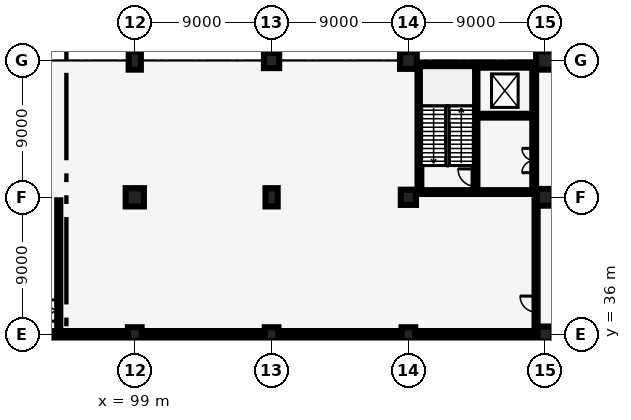
"""IFC4 building model, lengths in metres.
Left out: names, types, materials, properties, quantities, classifications, styles, units other than length and angle.
Written with IfcOpenShell. Run it as: python <this file> out.ifc"""

import sys

from ifc_helpers import new_model, si_unit, direction, frame, frame_2d, origin, origin_2d, place, context, subcontext, project, spatial, rectangle, extrude, element, fill, save


model = new_model("IFC4")
c1 = context("Model", 3, precision=1e-05, world=origin(), true_north=direction((0.0, 1.0)))
c2 = subcontext(c1, "Body", "Model", "MODEL_VIEW")
j1 = project(units=[si_unit("LENGTHUNIT", "METRE"), si_unit("PLANEANGLEUNIT", "RADIAN")], contexts=[c1])
p1 = place(None, origin())
s1 = spatial("IfcSite", under=j1, at=p1, CompositionType="ELEMENT")
p2 = place(p1, origin())
s2 = spatial("IfcBuilding", under=s1, at=p2, CompositionType="ELEMENT")
p3 = place(p2, frame((0.0, 0.0, -5.0)))
s3 = spatial("IfcBuildingStorey", under=s2, at=p3, CompositionType="ELEMENT", Elevation=-5.0)
p4 = place(p3, frame((99.0, 36.0, 0.0), z_axis=(0.0, 0.0, 1.0), x_axis=(1.0, 0.0, 0.0)))
e1 = element("IfcColumn", 1, at=p4, inside=s3, PredefinedType="COLUMN", context=c2, shape_type="SweptSolid", body=[
    extrude(rectangle(XDim=0.9, YDim=0.9, at=origin_2d()), origin(), (0.0, 0.0, 1.0), 5.0),
])
p5 = place(p3, frame((99.0, 45.0, 0.0), z_axis=(0.0, 0.0, 1.0), x_axis=(1.0, 0.0, 0.0)))
e2 = element("IfcColumn", 2, at=p5, inside=s3, PredefinedType="COLUMN", context=c2, shape_type="SweptSolid", body=[
    extrude(rectangle(XDim=1.2, YDim=1.2, at=origin_2d()), origin(), (0.0, 0.0, 1.0), 5.0),
])
p6 = place(p3, frame((99.0, 54.0, 0.0), z_axis=(0.0, 0.0, 1.0), x_axis=(1.0, 0.0, 0.0)))
e3 = element("IfcColumn", 3, at=p6, inside=s3, PredefinedType="COLUMN", context=c2, shape_type="SweptSolid", body=[
    extrude(rectangle(XDim=0.8, YDim=1.2, at=origin_2d()), origin(), (0.0, 0.0, 1.0), 5.0),
])
p7 = place(p3, frame((108.0, 36.0, 0.0), z_axis=(0.0, 0.0, 1.0), x_axis=(1.0, 0.0, 0.0)))
e4 = element("IfcColumn", 4, at=p7, inside=s3, PredefinedType="COLUMN", context=c2, shape_type="SweptSolid", body=[
    extrude(rectangle(XDim=0.9, YDim=0.9, at=origin_2d()), origin(), (0.0, 0.0, 1.0), 5.0),
])
p8 = place(p3, frame((108.0, 45.0, 0.0), z_axis=(0.0, 0.0, 1.0), x_axis=(1.0, 0.0, 0.0)))
e5 = element("IfcColumn", 5, at=p8, inside=s3, PredefinedType="COLUMN", context=c2, shape_type="SweptSolid", body=[
    extrude(rectangle(XDim=0.8, YDim=1.2, at=origin_2d()), origin(), (0.0, 0.0, 1.0), 5.0),
])
p9 = place(p3, frame((108.0, 54.0, 0.0), z_axis=(0.0, 0.0, 1.0), x_axis=(1.0, 0.0, 0.0)))
e6 = element("IfcColumn", 6, at=p9, inside=s3, PredefinedType="COLUMN", context=c2, shape_type="SweptSolid", body=[
    extrude(rectangle(XDim=1.0, YDim=1.0, at=origin_2d()), origin(), (0.0, 0.0, 1.0), 5.0),
])
p10 = place(p3, frame((117.0, 36.0, 0.0), z_axis=(0.0, 0.0, 1.0), x_axis=(1.0, 0.0, 0.0)))
e7 = element("IfcColumn", 7, at=p10, inside=s3, PredefinedType="COLUMN", context=c2, shape_type="SweptSolid", body=[
    extrude(rectangle(XDim=0.9, YDim=0.9, at=origin_2d()), origin(), (0.0, 0.0, 1.0), 5.0),
])
p11 = place(p3, frame((117.0, 45.0, 0.0), z_axis=(0.0, 0.0, 1.0), x_axis=(1.0, 0.0, 0.0)))
e8 = element("IfcColumn", 8, at=p11, inside=s3, PredefinedType="COLUMN", context=c2, shape_type="SweptSolid", body=[
    extrude(rectangle(XDim=1.0, YDim=1.0, at=origin_2d()), origin(), (0.0, 0.0, 1.0), 5.0),
])
p12 = place(p3, frame((117.0, 54.0, 0.0), z_axis=(0.0, 0.0, 1.0), x_axis=(1.0, 0.0, 0.0)))
e9 = element("IfcColumn", 9, at=p12, inside=s3, PredefinedType="COLUMN", context=c2, shape_type="SweptSolid", body=[
    extrude(rectangle(XDim=1.1, YDim=1.1, at=origin_2d()), origin(), (0.0, 0.0, 1.0), 5.0),
])
p13 = place(p3, frame((126.0, 36.0, 0.0), z_axis=(0.0, 0.0, 1.0), x_axis=(1.0, 0.0, 0.0)))
e10 = element("IfcColumn", 10, at=p13, inside=s3, PredefinedType="COLUMN", context=c2, shape_type="SweptSolid", body=[
    extrude(rectangle(XDim=1.0, YDim=1.0, at=origin_2d()), origin(), (0.0, 0.0, 1.0), 5.0),
])
p14 = place(p3, frame((126.0, 45.0, 0.0), z_axis=(0.0, 0.0, 1.0), x_axis=(1.0, 0.0, 0.0)))
e11 = element("IfcColumn", 11, at=p14, inside=s3, PredefinedType="COLUMN", context=c2, shape_type="SweptSolid", body=[
    extrude(rectangle(XDim=1.1, YDim=1.1, at=origin_2d()), origin(), (0.0, 0.0, 1.0), 5.0),
])
p15 = place(p3, frame((126.0, 54.0, 0.0), z_axis=(0.0, 0.0, 1.0), x_axis=(1.0, 0.0, 0.0)))
e12 = element("IfcColumn", 12, at=p15, inside=s3, PredefinedType="COLUMN", context=c2, shape_type="SweptSolid", body=[
    extrude(rectangle(XDim=1.2, YDim=1.2, at=origin_2d()), origin(), (0.0, 0.0, 1.0), 5.0),
])
p16 = place(p3, frame((63.545, 36.0, 0.0), z_axis=(0.0, 0.0, 1.0), x_axis=(1.0, 0.0, 0.0)))
e13 = element("IfcWall", 13, at=p16, inside=s3, PredefinedType="SHEAR", context=c2, shape_type="SweptSolid", body=[
    extrude(rectangle(XDim=61.96, YDim=0.4, at=frame_2d((30.98, 0.0))), origin(), (0.0, 0.0, 1.0), 3.95),
])
p17 = place(p3, frame((117.725, 45.47, 0.0), z_axis=(0.0, 0.0, 1.0), x_axis=(0.0, 1.0, 0.0)))
e14 = element("IfcWall", 14, at=p17, inside=s3, PredefinedType="SHEAR", context=c2, shape_type="SweptSolid", body=[
    extrude(rectangle(XDim=8.06, YDim=0.25, at=frame_2d((4.03, 0.0))), origin(), (0.0, 0.0, 1.0), 4.68),
])
p18 = place(p3, frame((125.275, 45.47, 0.0), z_axis=(0.0, 0.0, 1.0), x_axis=(0.0, 1.0, 0.0)))
e15 = element("IfcWall", 15, at=p18, inside=s3, PredefinedType="SHEAR", context=c2, shape_type="SweptSolid", body=[
    extrude(rectangle(XDim=8.06, YDim=0.25, at=frame_2d((4.03, 0.0))), origin(), (0.0, 0.0, 1.0), 4.68),
])
p19 = place(p18, frame((1.15, 0.0, 0.0)))
e16 = element("IfcOpeningElement", 16, at=p19, cuts=e15, PredefinedType="OPENING", context=c2, shape_type="SweptSolid", body=[
    extrude(rectangle(XDim=1.6, YDim=2.2, at=frame_2d((0.8, 1.1))), frame((0.0, 0.135, 0.0), z_axis=(0.0, -1.0, 0.0), x_axis=(1.0, 0.0, 0.0)), (0.0, 0.0, 1.0), 0.27),
])
for number, where, z_axis, x_axis in (
    (17, (117.6, 45.345, 0.0), (0.0, 0.0, 1.0), (1.0, 0.0, 0.0)),
    (18, (117.6, 53.655, 0.0), (0.0, 0.0, 1.0), (1.0, 0.0, 0.0)),
):
    element("IfcWall", number, at=place(p3, frame(where, z_axis=z_axis, x_axis=x_axis)), inside=s3, PredefinedType="SHEAR", context=c2, shape_type="SweptSolid", body=[
        extrude(rectangle(XDim=7.8, YDim=0.25, at=frame_2d((3.9, 0.0))), origin(), (0.0, 0.0, 1.0), 4.68),
    ])
p20 = place(p3, frame((121.415, 45.47, 0.0), z_axis=(0.0, 0.0, 1.0), x_axis=(0.0, 1.0, 0.0)))
e19 = element("IfcWall", 19, at=p20, inside=s3, PredefinedType="SHEAR", context=c2, shape_type="SweptSolid", body=[
    extrude(rectangle(XDim=8.06, YDim=0.25, at=frame_2d((4.03, 0.0))), origin(), (0.0, 0.0, 1.0), 4.68),
])
p21 = place(p20, frame((0.25, 0.0, 0.0)))
e20 = element("IfcOpeningElement", 20, at=p21, cuts=e19, PredefinedType="OPENING", context=c2, shape_type="SweptSolid", body=[
    extrude(rectangle(XDim=1.15, YDim=2.15, at=frame_2d((0.575, 1.075))), frame((0.0, 0.135, 0.0), z_axis=(0.0, -1.0, 0.0), x_axis=(1.0, 0.0, 0.0)), (0.0, 0.0, 1.0), 0.27),
])
p22 = place(p3, frame((121.54, 50.37, 0.0), z_axis=(0.0, 0.0, 1.0), x_axis=(1.0, 0.0, 0.0)))
e21 = element("IfcWall", 21, at=p22, inside=s3, PredefinedType="SHEAR", context=c2, shape_type="SweptSolid", body=[
    extrude(rectangle(XDim=3.61, YDim=0.25, at=frame_2d((1.805, 0.0))), origin(), (0.0, 0.0, 1.0), 4.68),
])
p23 = place(p22, frame((0.95, 0.0, 0.0)))
e22 = element("IfcOpeningElement", 22, at=p23, cuts=e21, PredefinedType="OPENING", context=c2, shape_type="SweptSolid", body=[
    extrude(rectangle(XDim=1.2, YDim=2.2, at=frame_2d((0.6, 1.1))), frame((0.0, 0.135, 0.0), z_axis=(0.0, -1.0, 0.0), x_axis=(1.0, 0.0, 0.0)), (0.0, 0.0, 1.0), 0.27),
])
p24 = place(p3, frame((94.0, 36.6, 0.0), z_axis=(0.0, 0.0, 1.0), x_axis=(0.0, 1.0, 0.0)))
e23 = element("IfcWall", 23, at=p24, inside=s3, PredefinedType="SOLIDWALL", context=c2, shape_type="SweptSolid", body=[
    extrude(rectangle(XDim=8.2, YDim=0.2, at=frame_2d((4.1, 0.0))), origin(), (0.0, 0.0, 1.0), 3.85),
])
p25 = place(p24, frame((0.25, 0.0, 0.0)))
e24 = element("IfcOpeningElement", 24, at=p25, cuts=e23, PredefinedType="OPENING", context=c2, shape_type="SweptSolid", body=[
    extrude(rectangle(XDim=1.4, YDim=2.25, at=frame_2d((0.7, 1.125))), frame((0.0, 0.11, 0.0), z_axis=(0.0, -1.0, 0.0), x_axis=(1.0, 0.0, 0.0)), (0.0, 0.0, 1.0), 0.22),
])
p26 = place(p3, frame((125.4, 36.6, 0.0), z_axis=(0.0, 0.0, 1.0), x_axis=(0.0, 1.0, 0.0)))
e25 = element("IfcWall", 25, at=p26, inside=s3, PredefinedType="SOLIDWALL", context=c2, shape_type="SweptSolid", body=[
    extrude(rectangle(XDim=8.2, YDim=0.2, at=frame_2d((4.1, 0.0))), origin(), (0.0, 0.0, 1.0), 3.85),
])
p27 = place(p26, frame((0.85, 0.0, 0.0)))
e26 = element("IfcOpeningElement", 26, at=p27, cuts=e25, PredefinedType="OPENING", context=c2, shape_type="SweptSolid", body=[
    extrude(rectangle(XDim=1.05, YDim=2.15, at=frame_2d((0.525, 1.075))), frame((0.0, 0.11, 0.0), z_axis=(0.0, -1.0, 0.0), x_axis=(1.0, 0.0, 0.0)), (0.0, 0.0, 1.0), 0.22),
])
p28 = place(p21, origin())
e27 = element("IfcDoor", 27, at=p28, inside=s3, OperationType="SINGLE_SWING_RIGHT", PredefinedType="DOOR", context=c2, shape_type="SweptSolid", body=[
    extrude(rectangle(XDim=1.15, YDim=2.15, at=frame_2d((0.575, 1.075))), frame((0.0, 0.025, 0.0), z_axis=(0.0, -1.0, 0.0), x_axis=(1.0, 0.0, 0.0)), (0.0, 0.0, 1.0), 0.05),
])
fill(e20, e27)
p29 = place(p23, origin())
e28 = element("IfcDoor", 28, at=p29, inside=s3, OperationType="DOUBLE_DOOR_SLIDING", PredefinedType="DOOR", context=c2, shape_type="SweptSolid", body=[
    extrude(rectangle(XDim=1.2, YDim=2.2, at=frame_2d((0.6, 1.1))), frame((0.0, 0.025, 0.0), z_axis=(0.0, -1.0, 0.0), x_axis=(1.0, 0.0, 0.0)), (0.0, 0.0, 1.0), 0.05),
])
fill(e22, e28)
p30 = place(p19, origin())
e29 = element("IfcDoor", 29, at=p30, inside=s3, OperationType="DOUBLE_DOOR_SINGLE_SWING", PredefinedType="DOOR", context=c2, shape_type="SweptSolid", body=[
    extrude(rectangle(XDim=1.6, YDim=2.2, at=frame_2d((0.8, 1.1))), frame((0.0, 0.025, 0.0), z_axis=(0.0, -1.0, 0.0), x_axis=(1.0, 0.0, 0.0)), (0.0, 0.0, 1.0), 0.05),
])
fill(e16, e29)
p31 = place(p25, origin())
e30 = element("IfcDoor", 30, at=p31, inside=s3, OperationType="DOUBLE_DOOR_SINGLE_SWING", PredefinedType="DOOR", context=c2, shape_type="SweptSolid", body=[
    extrude(rectangle(XDim=1.4, YDim=2.25, at=frame_2d((0.7, 1.125))), frame((0.0, 0.025, 0.0), z_axis=(0.0, -1.0, 0.0), x_axis=(1.0, 0.0, 0.0)), (0.0, 0.0, 1.0), 0.05),
])
fill(e24, e30)
p32 = place(p27, origin())
e31 = element("IfcDoor", 31, at=p32, inside=s3, OperationType="SINGLE_SWING_RIGHT", PredefinedType="DOOR", context=c2, shape_type="SweptSolid", body=[
    extrude(rectangle(XDim=1.05, YDim=2.15, at=frame_2d((0.525, 1.075))), frame((0.0, 0.025, 0.0), z_axis=(0.0, -1.0, 0.0), x_axis=(1.0, 0.0, 0.0)), (0.0, 0.0, 1.0), 0.05),
])
fill(e26, e31)
save(model, sys.argv[1])
